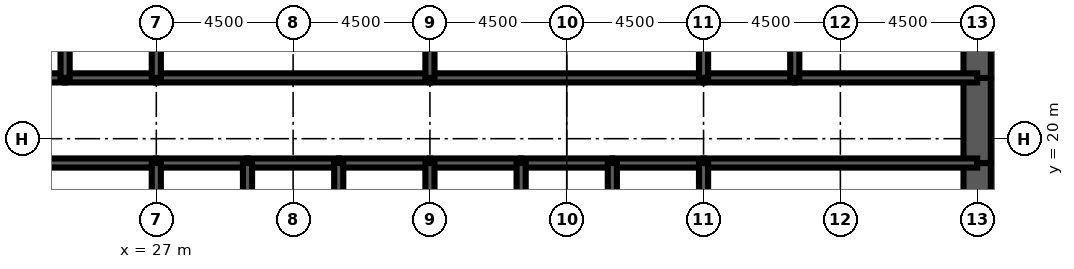
"""IFC4 building model, lengths in metres.
Left out: names, types, materials, properties, quantities, classifications, styles, units other than length and angle.
Written with IfcOpenShell. Run it as: python <this file> out.ifc"""

import sys

from ifc_helpers import new_model, si_unit, direction, frame, frame_2d, origin, place, context, subcontext, project, spatial, rectangle, extrude, element, fill, save


model = new_model("IFC4")
c1 = context("Model", 3, precision=1e-05, world=origin(), true_north=direction((0.0, 1.0)))
c2 = subcontext(c1, "Body", "Model", "MODEL_VIEW")
j1 = project(units=[si_unit("LENGTHUNIT", "METRE"), si_unit("PLANEANGLEUNIT", "RADIAN")], contexts=[c1])
p1 = place(None, origin())
s1 = spatial("IfcSite", under=j1, at=p1, CompositionType="ELEMENT")
p2 = place(p1, origin())
s2 = spatial("IfcBuilding", under=s1, at=p2, CompositionType="ELEMENT")
p3 = place(p2, frame((0.0, 0.0, 150.9)))
s3 = spatial("IfcBuildingStorey", under=s2, at=p3, CompositionType="ELEMENT", Elevation=150.9)
p4 = place(p3, frame((54.0, 16.0, 0.0), z_axis=(0.0, 0.0, 1.0), x_axis=(0.0, 1.0, 0.0)))
e1 = element("IfcWall", 1, at=p4, inside=s3, PredefinedType="SHEAR", context=c2, shape_type="SweptSolid", body=[
    extrude(rectangle(XDim=3.2, YDim=0.9, at=frame_2d((1.6, 0.0))), origin(), (0.0, 0.0, 1.0), 4.2),
])
p5 = place(p3, frame((54.0, 19.2, 0.0), z_axis=(0.0, 0.0, 1.0), x_axis=(0.0, 1.0, 0.0)))
e2 = element("IfcWall", 2, at=p5, inside=s3, PredefinedType="SHEAR", context=c2, shape_type="SweptSolid", body=[
    extrude(rectangle(XDim=2.8, YDim=0.9, at=frame_2d((1.4, 0.0))), origin(), (0.0, 0.0, 1.0), 4.2),
])
p6 = place(p5, frame((0.4, 0.0, 0.0)))
e3 = element("IfcOpeningElement", 3, at=p6, cuts=e2, PredefinedType="OPENING", context=c2, shape_type="SweptSolid", body=[
    extrude(rectangle(XDim=1.8, YDim=2.1, at=frame_2d((0.9, 1.05))), frame((0.0, 0.46, 0.0), z_axis=(0.0, -1.0, 0.0), x_axis=(1.0, 0.0, 0.0)), (0.0, 0.0, 1.0), 0.92),
])
p7 = place(p3, frame((54.0, 22.0, 0.0), z_axis=(0.0, 0.0, 1.0), x_axis=(0.0, 1.0, 0.0)))
e4 = element("IfcWall", 4, at=p7, inside=s3, PredefinedType="SHEAR", context=c2, shape_type="SweptSolid", body=[
    extrude(rectangle(XDim=4.0, YDim=0.9, at=frame_2d((2.0, 0.0))), origin(), (0.0, 0.0, 1.0), 4.2),
])
p8 = place(p3, frame((18.0, 19.2, 0.0), z_axis=(0.0, 0.0, 1.0), x_axis=(1.0, 0.0, 0.0)))
e5 = element("IfcWall", 5, at=p8, inside=s3, PredefinedType="SOLIDWALL", context=c2, shape_type="SweptSolid", body=[
    extrude(rectangle(XDim=9.0, YDim=0.3, at=frame_2d((4.5, 0.0))), origin(), (0.0, 0.0, 1.0), 4.2),
])
p9 = place(p8, frame((0.65, 0.0, 0.0)))
e6 = element("IfcOpeningElement", 6, at=p9, cuts=e5, PredefinedType="OPENING", context=c2, shape_type="SweptSolid", body=[
    extrude(rectangle(XDim=1.0, YDim=2.1, at=frame_2d((0.5, 1.05))), frame((0.0, 0.16, 0.0), z_axis=(0.0, -1.0, 0.0), x_axis=(1.0, 0.0, 0.0)), (0.0, 0.0, 1.0), 0.32),
])
p10 = place(p3, frame((27.0, 19.2, 0.0), z_axis=(0.0, 0.0, 1.0), x_axis=(1.0, 0.0, 0.0)))
e7 = element("IfcWall", 7, at=p10, inside=s3, PredefinedType="SOLIDWALL", context=c2, shape_type="SweptSolid", body=[
    extrude(rectangle(XDim=3.0, YDim=0.3, at=frame_2d((1.5, 0.0))), origin(), (0.0, 0.0, 1.0), 4.2),
])
p11 = place(p10, frame((0.95, 0.0, 0.0)))
e8 = element("IfcOpeningElement", 8, at=p11, cuts=e7, PredefinedType="OPENING", context=c2, shape_type="SweptSolid", body=[
    extrude(rectangle(XDim=1.1, YDim=2.2, at=frame_2d((0.55, 1.1))), frame((0.0, 0.16, 0.0), z_axis=(0.0, -1.0, 0.0), x_axis=(1.0, 0.0, 0.0)), (0.0, 0.0, 1.0), 0.32),
])
p12 = place(p3, frame((30.0, 19.2, 0.0), z_axis=(0.0, 0.0, 1.0), x_axis=(1.0, 0.0, 0.0)))
e9 = element("IfcWall", 9, at=p12, inside=s3, PredefinedType="SOLIDWALL", context=c2, shape_type="SweptSolid", body=[
    extrude(rectangle(XDim=3.0, YDim=0.3, at=frame_2d((1.5, 0.0))), origin(), (0.0, 0.0, 1.0), 4.2),
])
p13 = place(p12, frame((0.95, 0.0, 0.0)))
e10 = element("IfcOpeningElement", 10, at=p13, cuts=e9, PredefinedType="OPENING", context=c2, shape_type="SweptSolid", body=[
    extrude(rectangle(XDim=1.1, YDim=2.2, at=frame_2d((0.55, 1.1))), frame((0.0, 0.16, 0.0), z_axis=(0.0, -1.0, 0.0), x_axis=(1.0, 0.0, 0.0)), (0.0, 0.0, 1.0), 0.32),
])
p14 = place(p3, frame((33.0, 19.2, 0.0), z_axis=(0.0, 0.0, 1.0), x_axis=(1.0, 0.0, 0.0)))
e11 = element("IfcWall", 11, at=p14, inside=s3, PredefinedType="SOLIDWALL", context=c2, shape_type="SweptSolid", body=[
    extrude(rectangle(XDim=3.0, YDim=0.3, at=frame_2d((1.5, 0.0))), origin(), (0.0, 0.0, 1.0), 4.2),
])
p15 = place(p14, frame((0.95, 0.0, 0.0)))
e12 = element("IfcOpeningElement", 12, at=p15, cuts=e11, PredefinedType="OPENING", context=c2, shape_type="SweptSolid", body=[
    extrude(rectangle(XDim=1.1, YDim=2.2, at=frame_2d((0.55, 1.1))), frame((0.0, 0.16, 0.0), z_axis=(0.0, -1.0, 0.0), x_axis=(1.0, 0.0, 0.0)), (0.0, 0.0, 1.0), 0.32),
])
p16 = place(p3, frame((36.0, 19.2, 0.0), z_axis=(0.0, 0.0, 1.0), x_axis=(1.0, 0.0, 0.0)))
e13 = element("IfcWall", 13, at=p16, inside=s3, PredefinedType="SOLIDWALL", context=c2, shape_type="SweptSolid", body=[
    extrude(rectangle(XDim=3.0, YDim=0.3, at=frame_2d((1.5, 0.0))), origin(), (0.0, 0.0, 1.0), 4.2),
])
p17 = place(p16, frame((0.95, 0.0, 0.0)))
e14 = element("IfcOpeningElement", 14, at=p17, cuts=e13, PredefinedType="OPENING", context=c2, shape_type="SweptSolid", body=[
    extrude(rectangle(XDim=1.1, YDim=2.2, at=frame_2d((0.55, 1.1))), frame((0.0, 0.16, 0.0), z_axis=(0.0, -1.0, 0.0), x_axis=(1.0, 0.0, 0.0)), (0.0, 0.0, 1.0), 0.32),
])
p18 = place(p3, frame((39.0, 19.2, 0.0), z_axis=(0.0, 0.0, 1.0), x_axis=(1.0, 0.0, 0.0)))
e15 = element("IfcWall", 15, at=p18, inside=s3, PredefinedType="SOLIDWALL", context=c2, shape_type="SweptSolid", body=[
    extrude(rectangle(XDim=3.0, YDim=0.3, at=frame_2d((1.5, 0.0))), origin(), (0.0, 0.0, 1.0), 4.2),
])
p19 = place(p18, frame((1.0, 0.0, 0.0)))
e16 = element("IfcOpeningElement", 16, at=p19, cuts=e15, PredefinedType="OPENING", context=c2, shape_type="SweptSolid", body=[
    extrude(rectangle(XDim=1.0, YDim=2.1, at=frame_2d((0.5, 1.05))), frame((0.0, 0.16, 0.0), z_axis=(0.0, -1.0, 0.0), x_axis=(1.0, 0.0, 0.0)), (0.0, 0.0, 1.0), 0.32),
])
p20 = place(p3, frame((42.0, 19.2, 0.0), z_axis=(0.0, 0.0, 1.0), x_axis=(1.0, 0.0, 0.0)))
e17 = element("IfcWall", 17, at=p20, inside=s3, PredefinedType="SOLIDWALL", context=c2, shape_type="SweptSolid", body=[
    extrude(rectangle(XDim=3.0, YDim=0.3, at=frame_2d((1.5, 0.0))), origin(), (0.0, 0.0, 1.0), 4.2),
])
p21 = place(p3, frame((45.0, 19.2, 0.0), z_axis=(0.0, 0.0, 1.0), x_axis=(1.0, 0.0, 0.0)))
e18 = element("IfcWall", 18, at=p21, inside=s3, PredefinedType="SOLIDWALL", context=c2, shape_type="SweptSolid", body=[
    extrude(rectangle(XDim=9.0, YDim=0.3, at=frame_2d((4.5, 0.0))), origin(), (0.0, 0.0, 1.0), 4.2),
])
p22 = place(p21, frame((7.35, 0.0, 0.0)))
e19 = element("IfcOpeningElement", 19, at=p22, cuts=e18, PredefinedType="OPENING", context=c2, shape_type="SweptSolid", body=[
    extrude(rectangle(XDim=1.0, YDim=2.1, at=frame_2d((0.5, 1.05))), frame((0.0, 0.16, 0.0), z_axis=(0.0, -1.0, 0.0), x_axis=(1.0, 0.0, 0.0)), (0.0, 0.0, 1.0), 0.32),
])
p23 = place(p3, frame((18.0, 22.0, 0.0), z_axis=(0.0, 0.0, 1.0), x_axis=(1.0, 0.0, 0.0)))
e20 = element("IfcWall", 20, at=p23, inside=s3, PredefinedType="SOLIDWALL", context=c2, shape_type="SweptSolid", body=[
    extrude(rectangle(XDim=6.0, YDim=0.3, at=frame_2d((3.0, 0.0))), origin(), (0.0, 0.0, 1.0), 4.2),
])
p24 = place(p23, frame((4.4, 0.0, 0.0)))
e21 = element("IfcOpeningElement", 21, at=p24, cuts=e20, PredefinedType="OPENING", context=c2, shape_type="SweptSolid", body=[
    extrude(rectangle(XDim=1.0, YDim=2.1, at=frame_2d((0.5, 1.05))), frame((0.0, 0.16, 0.0), z_axis=(0.0, -1.0, 0.0), x_axis=(1.0, 0.0, 0.0)), (0.0, 0.0, 1.0), 0.32),
])
p25 = place(p23, frame((0.85, 0.0, 0.0)))
e22 = element("IfcOpeningElement", 22, at=p25, cuts=e20, PredefinedType="OPENING", context=c2, shape_type="SweptSolid", body=[
    extrude(rectangle(XDim=1.0, YDim=2.1, at=frame_2d((0.5, 1.05))), frame((0.0, 0.16, 0.0), z_axis=(0.0, -1.0, 0.0), x_axis=(1.0, 0.0, 0.0)), (0.0, 0.0, 1.0), 0.32),
])
p26 = place(p3, frame((24.0, 22.0, 0.0), z_axis=(0.0, 0.0, 1.0), x_axis=(1.0, 0.0, 0.0)))
e23 = element("IfcWall", 23, at=p26, inside=s3, PredefinedType="SOLIDWALL", context=c2, shape_type="SweptSolid", body=[
    extrude(rectangle(XDim=3.0, YDim=0.3, at=frame_2d((1.5, 0.0))), origin(), (0.0, 0.0, 1.0), 4.2),
])
p27 = place(p26, frame((1.0, 0.0, 0.0)))
e24 = element("IfcOpeningElement", 24, at=p27, cuts=e23, PredefinedType="OPENING", context=c2, shape_type="SweptSolid", body=[
    extrude(rectangle(XDim=1.0, YDim=2.1, at=frame_2d((0.5, 1.05))), frame((0.0, 0.16, 0.0), z_axis=(0.0, -1.0, 0.0), x_axis=(1.0, 0.0, 0.0)), (0.0, 0.0, 1.0), 0.32),
])
p28 = place(p3, frame((27.0, 22.0, 0.0), z_axis=(0.0, 0.0, 1.0), x_axis=(1.0, 0.0, 0.0)))
e25 = element("IfcWall", 25, at=p28, inside=s3, PredefinedType="SOLIDWALL", context=c2, shape_type="SweptSolid", body=[
    extrude(rectangle(XDim=9.0, YDim=0.3, at=frame_2d((4.5, 0.0))), origin(), (0.0, 0.0, 1.0), 4.2),
])
p29 = place(p28, frame((4.0, 0.0, 0.0)))
e26 = element("IfcOpeningElement", 26, at=p29, cuts=e25, PredefinedType="OPENING", context=c2, shape_type="SweptSolid", body=[
    extrude(rectangle(XDim=1.0, YDim=2.1, at=frame_2d((0.5, 1.05))), frame((0.0, 0.16, 0.0), z_axis=(0.0, -1.0, 0.0), x_axis=(1.0, 0.0, 0.0)), (0.0, 0.0, 1.0), 0.32),
])
p30 = place(p3, frame((36.0, 22.0, 0.0), z_axis=(0.0, 0.0, 1.0), x_axis=(1.0, 0.0, 0.0)))
e27 = element("IfcWall", 27, at=p30, inside=s3, PredefinedType="SOLIDWALL", context=c2, shape_type="SweptSolid", body=[
    extrude(rectangle(XDim=9.0, YDim=0.3, at=frame_2d((4.5, 0.0))), origin(), (0.0, 0.0, 1.0), 4.2),
])
p31 = place(p30, frame((4.0, 0.0, 0.0)))
e28 = element("IfcOpeningElement", 28, at=p31, cuts=e27, PredefinedType="OPENING", context=c2, shape_type="SweptSolid", body=[
    extrude(rectangle(XDim=1.0, YDim=2.1, at=frame_2d((0.5, 1.05))), frame((0.0, 0.16, 0.0), z_axis=(0.0, -1.0, 0.0), x_axis=(1.0, 0.0, 0.0)), (0.0, 0.0, 1.0), 0.32),
])
p32 = place(p3, frame((45.0, 22.0, 0.0), z_axis=(0.0, 0.0, 1.0), x_axis=(1.0, 0.0, 0.0)))
e29 = element("IfcWall", 29, at=p32, inside=s3, PredefinedType="SOLIDWALL", context=c2, shape_type="SweptSolid", body=[
    extrude(rectangle(XDim=3.0, YDim=0.3, at=frame_2d((1.5, 0.0))), origin(), (0.0, 0.0, 1.0), 4.2),
])
p33 = place(p32, frame((1.0, 0.0, 0.0)))
e30 = element("IfcOpeningElement", 30, at=p33, cuts=e29, PredefinedType="OPENING", context=c2, shape_type="SweptSolid", body=[
    extrude(rectangle(XDim=1.0, YDim=2.1, at=frame_2d((0.5, 1.05))), frame((0.0, 0.16, 0.0), z_axis=(0.0, -1.0, 0.0), x_axis=(1.0, 0.0, 0.0)), (0.0, 0.0, 1.0), 0.32),
])
p34 = place(p3, frame((48.0, 22.0, 0.0), z_axis=(0.0, 0.0, 1.0), x_axis=(1.0, 0.0, 0.0)))
e31 = element("IfcWall", 31, at=p34, inside=s3, PredefinedType="SOLIDWALL", context=c2, shape_type="SweptSolid", body=[
    extrude(rectangle(XDim=6.0, YDim=0.3, at=frame_2d((3.0, 0.0))), origin(), (0.0, 0.0, 1.0), 4.2),
])
p35 = place(p34, frame((2.0, 0.0, 0.0)))
e32 = element("IfcOpeningElement", 32, at=p35, cuts=e31, PredefinedType="OPENING", context=c2, shape_type="SweptSolid", body=[
    extrude(rectangle(XDim=1.0, YDim=2.1, at=frame_2d((0.5, 1.05))), frame((0.0, 0.16, 0.0), z_axis=(0.0, -1.0, 0.0), x_axis=(1.0, 0.0, 0.0)), (0.0, 0.0, 1.0), 0.32),
])
p36 = place(p34, frame((4.15, 0.0, 0.0)))
e33 = element("IfcOpeningElement", 33, at=p36, cuts=e31, PredefinedType="OPENING", context=c2, shape_type="SweptSolid", body=[
    extrude(rectangle(XDim=1.0, YDim=2.1, at=frame_2d((0.5, 1.05))), frame((0.0, 0.16, 0.0), z_axis=(0.0, -1.0, 0.0), x_axis=(1.0, 0.0, 0.0)), (0.0, 0.0, 1.0), 0.32),
])
for number, where, z_axis, x_axis in (
    (34, (27.0, 16.0, 0.0), (0.0, 0.0, 1.0), (0.0, 1.0, 0.0)),
    (35, (30.0, 16.0, 0.0), (0.0, 0.0, 1.0), (0.0, 1.0, 0.0)),
    (36, (33.0, 16.0, 0.0), (0.0, 0.0, 1.0), (0.0, 1.0, 0.0)),
    (37, (36.0, 16.0, 0.0), (0.0, 0.0, 1.0), (0.0, 1.0, 0.0)),
    (38, (39.0, 16.0, 0.0), (0.0, 0.0, 1.0), (0.0, 1.0, 0.0)),
    (39, (42.0, 16.0, 0.0), (0.0, 0.0, 1.0), (0.0, 1.0, 0.0)),
    (40, (45.0, 16.0, 0.0), (0.0, 0.0, 1.0), (0.0, 1.0, 0.0)),
):
    element("IfcWall", number, at=place(p3, frame(where, z_axis=z_axis, x_axis=x_axis)), inside=s3, PredefinedType="SOLIDWALL", context=c2, shape_type="SweptSolid", body=[
        extrude(rectangle(XDim=3.2, YDim=0.3, at=frame_2d((1.6, 0.0))), origin(), (0.0, 0.0, 1.0), 4.2),
    ])
for number, where, z_axis, x_axis in (
    (41, (24.0, 22.0, 0.0), (0.0, 0.0, 1.0), (0.0, 1.0, 0.0)),
    (42, (27.0, 22.0, 0.0), (0.0, 0.0, 1.0), (0.0, 1.0, 0.0)),
    (43, (36.0, 22.0, 0.0), (0.0, 0.0, 1.0), (0.0, 1.0, 0.0)),
    (44, (45.0, 22.0, 0.0), (0.0, 0.0, 1.0), (0.0, 1.0, 0.0)),
    (45, (48.0, 22.0, 0.0), (0.0, 0.0, 1.0), (0.0, 1.0, 0.0)),
):
    element("IfcWall", number, at=place(p3, frame(where, z_axis=z_axis, x_axis=x_axis)), inside=s3, PredefinedType="SOLIDWALL", context=c2, shape_type="SweptSolid", body=[
        extrude(rectangle(XDim=4.0, YDim=0.3, at=frame_2d((2.0, 0.0))), origin(), (0.0, 0.0, 1.0), 4.2),
    ])
p37 = place(p3, frame((42.5, 22.15, 0.0), z_axis=(0.0, 0.0, 1.0), x_axis=(0.0, 1.0, 0.0)))
e46 = element("IfcWall", 46, at=p37, inside=s3, PredefinedType="PARTITIONING", context=c2, shape_type="SweptSolid", body=[
    extrude(rectangle(XDim=3.7, YDim=0.15, at=frame_2d((1.85, 0.0))), origin(), (0.0, 0.0, 1.0), 3.0),
])
p38 = place(p37, frame((2.2, 0.0, 0.0)))
e47 = element("IfcOpeningElement", 47, at=p38, cuts=e46, PredefinedType="OPENING", context=c2, shape_type="SweptSolid", body=[
    extrude(rectangle(XDim=1.0, YDim=2.1, at=frame_2d((0.5, 1.05))), frame((0.0, 0.085, 0.0), z_axis=(0.0, -1.0, 0.0), x_axis=(1.0, 0.0, 0.0)), (0.0, 0.0, 1.0), 0.17),
])
p39 = place(p3, frame((51.675, 22.15, 0.0), z_axis=(0.0, 0.0, 1.0), x_axis=(0.0, 1.0, 0.0)))
e48 = element("IfcWall", 48, at=p39, inside=s3, PredefinedType="PARTITIONING", context=c2, shape_type="SweptSolid", body=[
    extrude(rectangle(XDim=3.7, YDim=0.15, at=frame_2d((1.85, 0.0))), origin(), (0.0, 0.0, 1.0), 3.0),
])
p40 = place(p3, frame((24.5, 19.35, 0.0), z_axis=(0.0, 0.0, 1.0), x_axis=(0.0, 1.0, 0.0)))
e49 = element("IfcWall", 49, at=p40, inside=s3, PredefinedType="PARTITIONING", context=c2, shape_type="SweptSolid", body=[
    extrude(rectangle(XDim=2.5, YDim=0.15, at=frame_2d((1.25, 0.0))), origin(), (0.0, 0.0, 1.0), 3.0),
])
p41 = place(p40, frame((1.15, 0.0, 0.0)))
e50 = element("IfcOpeningElement", 50, at=p41, cuts=e49, PredefinedType="OPENING", context=c2, shape_type="SweptSolid", body=[
    extrude(rectangle(XDim=1.0, YDim=2.1, at=frame_2d((0.5, 1.05))), frame((0.0, 0.085, 0.0), z_axis=(0.0, -1.0, 0.0), x_axis=(1.0, 0.0, 0.0)), (0.0, 0.0, 1.0), 0.17),
])
p42 = place(p41, origin())
e51 = element("IfcDoor", 51, at=p42, inside=s3, OperationType="SINGLE_SWING_RIGHT", PredefinedType="DOOR", context=c2, shape_type="SweptSolid", body=[
    extrude(rectangle(XDim=1.0, YDim=2.1, at=frame_2d((0.5, 1.05))), frame((0.0, 0.025, 0.0), z_axis=(0.0, -1.0, 0.0), x_axis=(1.0, 0.0, 0.0)), (0.0, 0.0, 1.0), 0.05),
])
fill(e50, e51)
p43 = place(p11, origin())
e52 = element("IfcDoor", 52, at=p43, inside=s3, OperationType="DOUBLE_DOOR_SLIDING", PredefinedType="USERDEFINED", context=c2, shape_type="SweptSolid", body=[
    extrude(rectangle(XDim=1.1, YDim=2.2, at=frame_2d((0.55, 1.1))), frame((0.0, 0.025, 0.0), z_axis=(0.0, -1.0, 0.0), x_axis=(1.0, 0.0, 0.0)), (0.0, 0.0, 1.0), 0.05),
])
fill(e8, e52)
p44 = place(p13, origin())
e53 = element("IfcDoor", 53, at=p44, inside=s3, OperationType="DOUBLE_DOOR_SLIDING", PredefinedType="USERDEFINED", context=c2, shape_type="SweptSolid", body=[
    extrude(rectangle(XDim=1.1, YDim=2.2, at=frame_2d((0.55, 1.1))), frame((0.0, 0.025, 0.0), z_axis=(0.0, -1.0, 0.0), x_axis=(1.0, 0.0, 0.0)), (0.0, 0.0, 1.0), 0.05),
])
fill(e10, e53)
p45 = place(p15, origin())
e54 = element("IfcDoor", 54, at=p45, inside=s3, OperationType="DOUBLE_DOOR_SLIDING", PredefinedType="USERDEFINED", context=c2, shape_type="SweptSolid", body=[
    extrude(rectangle(XDim=1.1, YDim=2.2, at=frame_2d((0.55, 1.1))), frame((0.0, 0.025, 0.0), z_axis=(0.0, -1.0, 0.0), x_axis=(1.0, 0.0, 0.0)), (0.0, 0.0, 1.0), 0.05),
])
fill(e12, e54)
p46 = place(p17, origin())
e55 = element("IfcDoor", 55, at=p46, inside=s3, OperationType="DOUBLE_DOOR_SLIDING", PredefinedType="USERDEFINED", context=c2, shape_type="SweptSolid", body=[
    extrude(rectangle(XDim=1.1, YDim=2.2, at=frame_2d((0.55, 1.1))), frame((0.0, 0.025, 0.0), z_axis=(0.0, -1.0, 0.0), x_axis=(1.0, 0.0, 0.0)), (0.0, 0.0, 1.0), 0.05),
])
fill(e14, e55)
p47 = place(p22, origin())
e56 = element("IfcDoor", 56, at=p47, inside=s3, OperationType="SINGLE_SWING_RIGHT", PredefinedType="DOOR", context=c2, shape_type="SweptSolid", body=[
    extrude(rectangle(XDim=1.0, YDim=2.1, at=frame_2d((0.5, 1.05))), frame((0.0, 0.025, 0.0), z_axis=(0.0, -1.0, 0.0), x_axis=(1.0, 0.0, 0.0)), (0.0, 0.0, 1.0), 0.05),
])
fill(e19, e56)
p48 = place(p6, origin())
e57 = element("IfcDoor", 57, at=p48, inside=s3, OperationType="SINGLE_SWING_LEFT", PredefinedType="DOOR", context=c2, shape_type="SweptSolid", body=[
    extrude(rectangle(XDim=1.8, YDim=2.1, at=frame_2d((0.9, 1.05))), frame((0.0, 0.45, 0.0), z_axis=(0.0, -1.0, 0.0), x_axis=(1.0, 0.0, 0.0)), (0.0, 0.0, 1.0), 0.899),
])
fill(e3, e57)
p49 = place(p27, origin())
e58 = element("IfcDoor", 58, at=p49, inside=s3, OperationType="SINGLE_SWING_LEFT", PredefinedType="DOOR", context=c2, shape_type="SweptSolid", body=[
    extrude(rectangle(XDim=1.0, YDim=2.1, at=frame_2d((0.5, 1.05))), frame((0.0, 0.025, 0.0), z_axis=(0.0, -1.0, 0.0), x_axis=(1.0, 0.0, 0.0)), (0.0, 0.0, 1.0), 0.05),
])
fill(e24, e58)
p50 = place(p29, origin())
e59 = element("IfcDoor", 59, at=p50, inside=s3, OperationType="SINGLE_SWING_LEFT", PredefinedType="DOOR", context=c2, shape_type="SweptSolid", body=[
    extrude(rectangle(XDim=1.0, YDim=2.1, at=frame_2d((0.5, 1.05))), frame((0.0, 0.025, 0.0), z_axis=(0.0, -1.0, 0.0), x_axis=(1.0, 0.0, 0.0)), (0.0, 0.0, 1.0), 0.05),
])
fill(e26, e59)
p51 = place(p31, origin())
e60 = element("IfcDoor", 60, at=p51, inside=s3, OperationType="SINGLE_SWING_LEFT", PredefinedType="DOOR", context=c2, shape_type="SweptSolid", body=[
    extrude(rectangle(XDim=1.0, YDim=2.1, at=frame_2d((0.5, 1.05))), frame((0.0, 0.025, 0.0), z_axis=(0.0, -1.0, 0.0), x_axis=(1.0, 0.0, 0.0)), (0.0, 0.0, 1.0), 0.05),
])
fill(e28, e60)
p52 = place(p33, origin())
e61 = element("IfcDoor", 61, at=p52, inside=s3, OperationType="SINGLE_SWING_LEFT", PredefinedType="DOOR", context=c2, shape_type="SweptSolid", body=[
    extrude(rectangle(XDim=1.0, YDim=2.1, at=frame_2d((0.5, 1.05))), frame((0.0, 0.025, 0.0), z_axis=(0.0, -1.0, 0.0), x_axis=(1.0, 0.0, 0.0)), (0.0, 0.0, 1.0), 0.05),
])
fill(e30, e61)
p53 = place(p35, origin())
e62 = element("IfcDoor", 62, at=p53, inside=s3, OperationType="SINGLE_SWING_LEFT", PredefinedType="DOOR", context=c2, shape_type="SweptSolid", body=[
    extrude(rectangle(XDim=1.0, YDim=2.1, at=frame_2d((0.5, 1.05))), frame((0.0, 0.025, 0.0), z_axis=(0.0, -1.0, 0.0), x_axis=(1.0, 0.0, 0.0)), (0.0, 0.0, 1.0), 0.05),
])
fill(e32, e62)
p54 = place(p36, origin())
e63 = element("IfcDoor", 63, at=p54, inside=s3, OperationType="SINGLE_SWING_RIGHT", PredefinedType="DOOR", context=c2, shape_type="SweptSolid", body=[
    extrude(rectangle(XDim=1.0, YDim=2.1, at=frame_2d((0.5, 1.05))), frame((0.0, 0.025, 0.0), z_axis=(0.0, -1.0, 0.0), x_axis=(1.0, 0.0, 0.0)), (0.0, 0.0, 1.0), 0.05),
])
fill(e33, e63)
p55 = place(p19, origin())
e64 = element("IfcDoor", 64, at=p55, inside=s3, OperationType="SINGLE_SWING_LEFT", PredefinedType="DOOR", context=c2, shape_type="SweptSolid", body=[
    extrude(rectangle(XDim=1.0, YDim=2.1, at=frame_2d((0.5, 1.05))), frame((0.0, 0.025, 0.0), z_axis=(0.0, -1.0, 0.0), x_axis=(1.0, 0.0, 0.0)), (0.0, 0.0, 1.0), 0.05),
])
fill(e16, e64)
save(model, sys.argv[1])
